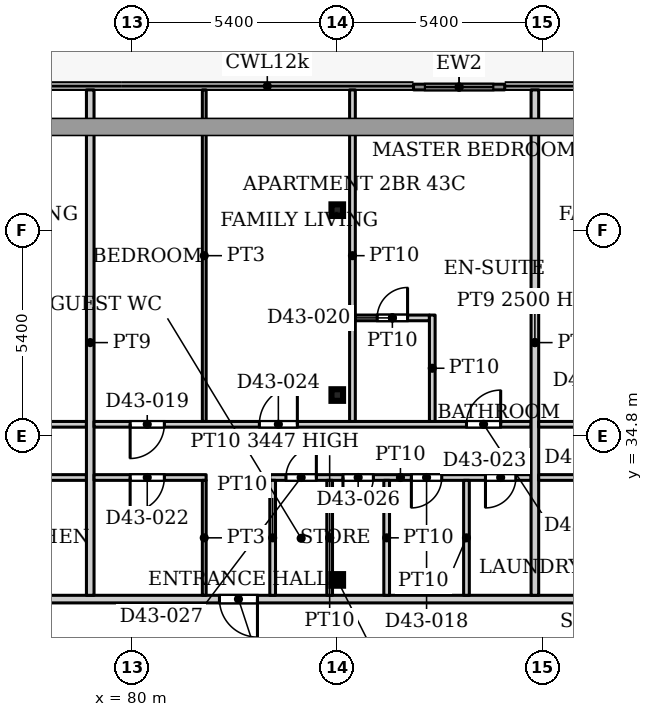
"""IFC4 building model, lengths in metres.
Left out: names, types, materials, properties, quantities, classifications, styles, units other than length and angle.
Written with IfcOpenShell. Run it as: python <this file> out.ifc"""

import sys

from ifc_helpers import new_model, si_unit, direction, frame, frame_2d, origin, origin_2d, place, context, subcontext, project, spatial, rectangle, hollow_rectangle, extrude, source, transform, mapped, element, fill, save


model = new_model("IFC4")
c1 = context("Model", 3, precision=1e-05, world=origin(), true_north=direction((0.0, 1.0)))
c2 = subcontext(c1, "Body", "Model", "MODEL_VIEW")
j1 = project(units=[si_unit("LENGTHUNIT", "METRE"), si_unit("PLANEANGLEUNIT", "RADIAN")], contexts=[c1])
p1 = place(None, origin())
s1 = spatial("IfcSite", under=j1, at=p1, CompositionType="ELEMENT")
p2 = place(p1, origin())
s2 = spatial("IfcBuilding", under=s1, at=p2, CompositionType="ELEMENT")
p3 = place(p2, frame((0.0, 0.0, 183.8)))
s3 = spatial("IfcBuildingStorey", under=s2, at=p3, CompositionType="ELEMENT", Elevation=183.8)
for number, where, z_axis, x_axis in (
    (1, (85.4, 31.005, 0.0), (0.0, 0.0, 1.0), (1.0, 0.0, 0.0)),
    (2, (85.4, 35.87, 0.0), (0.0, 0.0, 1.0), (1.0, 0.0, 0.0)),
    (3, (85.4, 40.735, 0.0), (0.0, 0.0, 1.0), (1.0, 0.0, 0.0)),
):
    element("IfcColumn", number, at=place(p3, frame(where, z_axis=z_axis, x_axis=x_axis)), inside=s3, PredefinedType="COLUMN", context=c2, shape_type="SweptSolid", body=[
        extrude(hollow_rectangle(XDim=0.305, YDim=0.305, WallThickness=0.016, InnerFilletRadius=0.016, OuterFilletRadius=0.032, at=origin_2d()), origin(), (0.0, 0.0, 1.0), 3.9),
    ])
p4 = place(p3, frame((87.406, 43.975, 0.0), z_axis=(0.0, 0.0, 1.0), x_axis=(1.0, 0.0, 0.0)))
e4 = element("IfcWall", 4, at=p4, inside=s3, PredefinedType="SOLIDWALL", context=c2, shape_type="SweptSolid", body=[
    extrude(rectangle(XDim=2.4, YDim=0.15, at=frame_2d((1.2, 0.0))), origin(), (0.0, 0.0, 1.0), 3.75),
])
p5 = place(p4, frame((0.3, 0.0, 0.0)))
e5 = element("IfcOpeningElement", 5, at=p5, cuts=e4, PredefinedType="OPENING", context=c2, shape_type="SweptSolid", body=[
    extrude(rectangle(XDim=1.8, YDim=2.4, at=frame_2d((0.9, 1.2))), frame((0.0, 0.085, 0.0), z_axis=(0.0, -1.0, 0.0), x_axis=(1.0, 0.0, 0.0)), (0.0, 0.0, 1.0), 0.17),
])
p6 = place(p3, frame((53.549, 30.5, 0.0), z_axis=(0.0, 0.0, 1.0), x_axis=(1.0, 0.0, 0.0)))
e6 = element("IfcWall", 6, at=p6, inside=s3, PredefinedType="PARTITIONING", context=c2, shape_type="SweptSolid", body=[
    extrude(rectangle(XDim=44.551, YDim=0.2, at=frame_2d((22.275, 0.0))), origin(), (0.0, 0.0, 1.0), 3.6),
])
p7 = place(p6, frame((8.351, 0.0, 0.0)))
e7 = element("IfcOpeningElement", 7, at=p7, cuts=e6, PredefinedType="OPENING", context=c2, shape_type="SweptSolid", body=[
    extrude(rectangle(XDim=1.0, YDim=2.1, at=frame_2d((0.5, 1.05))), frame((0.0, 0.11, 0.0), z_axis=(0.0, -1.0, 0.0), x_axis=(1.0, 0.0, 0.0)), (0.0, 0.0, 1.0), 0.22),
])
p8 = place(p6, frame((12.551, 0.0, 0.0)))
e8 = element("IfcOpeningElement", 8, at=p8, cuts=e6, PredefinedType="OPENING", context=c2, shape_type="SweptSolid", body=[
    extrude(rectangle(XDim=1.0, YDim=2.1, at=frame_2d((0.5, 1.05))), frame((0.0, 0.11, 0.0), z_axis=(0.0, -1.0, 0.0), x_axis=(1.0, 0.0, 0.0)), (0.0, 0.0, 1.0), 0.22),
])
p9 = place(p6, frame((28.751, 0.0, 0.0)))
e9 = element("IfcOpeningElement", 9, at=p9, cuts=e6, PredefinedType="OPENING", context=c2, shape_type="SweptSolid", body=[
    extrude(rectangle(XDim=1.0, YDim=2.1, at=frame_2d((0.5, 1.05))), frame((0.0, 0.11, 0.0), z_axis=(0.0, -1.0, 0.0), x_axis=(1.0, 0.0, 0.0)), (0.0, 0.0, 1.0), 0.22),
])
p10 = place(p6, frame((40.751, 0.0, 0.0)))
e10 = element("IfcOpeningElement", 10, at=p10, cuts=e6, PredefinedType="OPENING", context=c2, shape_type="SweptSolid", body=[
    extrude(rectangle(XDim=1.0, YDim=2.1, at=frame_2d((0.5, 1.05))), frame((0.0, 0.11, 0.0), z_axis=(0.0, -1.0, 0.0), x_axis=(1.0, 0.0, 0.0)), (0.0, 0.0, 1.0), 0.22),
])
p11 = place(p3, frame((65.5, 35.1, 0.0), z_axis=(0.0, 0.0, 1.0), x_axis=(1.0, 0.0, 0.0)))
e11 = element("IfcWall", 11, at=p11, inside=s3, PredefinedType="PARTITIONING", context=c2, shape_type="SweptSolid", body=[
    extrude(rectangle(XDim=13.3, YDim=0.15, at=frame_2d((6.65, 0.0))), origin(), (0.0, 0.0, 1.0), 3.6),
])
p12 = place(p11, frame((1.4, 0.0, 0.0)))
e12 = element("IfcOpeningElement", 12, at=p12, cuts=e11, PredefinedType="OPENING", context=c2, shape_type="SweptSolid", body=[
    extrude(rectangle(XDim=0.9, YDim=2.1, at=frame_2d((0.45, 1.05))), frame((0.0, 0.085, 0.0), z_axis=(0.0, -1.0, 0.0), x_axis=(1.0, 0.0, 0.0)), (0.0, 0.0, 1.0), 0.17),
])
p13 = place(p11, frame((10.5, 0.0, 0.0)))
e13 = element("IfcOpeningElement", 13, at=p13, cuts=e11, PredefinedType="OPENING", context=c2, shape_type="SweptSolid", body=[
    extrude(rectangle(XDim=1.0, YDim=2.1, at=frame_2d((0.5, 1.05))), frame((0.0, 0.085, 0.0), z_axis=(0.0, -1.0, 0.0), x_axis=(1.0, 0.0, 0.0)), (0.0, 0.0, 1.0), 0.17),
])
p14 = place(p11, frame((6.8, 0.0, 0.0)))
e14 = element("IfcOpeningElement", 14, at=p14, cuts=e11, PredefinedType="OPENING", context=c2, shape_type="SweptSolid", body=[
    extrude(rectangle(XDim=0.9, YDim=2.1, at=frame_2d((0.45, 1.05))), frame((0.0, 0.085, 0.0), z_axis=(0.0, -1.0, 0.0), x_axis=(1.0, 0.0, 0.0)), (0.0, 0.0, 1.0), 0.17),
])
p15 = place(p3, frame((68.625, 33.7, 0.0), z_axis=(0.0, 0.0, 1.0), x_axis=(1.0, 0.0, 0.0)))
e15 = element("IfcWall", 15, at=p15, inside=s3, PredefinedType="PARTITIONING", context=c2, shape_type="SweptSolid", body=[
    extrude(rectangle(XDim=10.175, YDim=0.15, at=frame_2d((5.087, 0.0))), origin(), (0.0, 0.0, 1.0), 3.6),
])
p16 = place(p15, frame((1.175, 0.0, 0.0)))
e16 = element("IfcOpeningElement", 16, at=p16, cuts=e15, PredefinedType="OPENING", context=c2, shape_type="SweptSolid", body=[
    extrude(rectangle(XDim=0.8, YDim=2.1, at=frame_2d((0.4, 1.05))), frame((0.0, 0.085, 0.0), z_axis=(0.0, -1.0, 0.0), x_axis=(1.0, 0.0, 0.0)), (0.0, 0.0, 1.0), 0.17),
])
p17 = place(p15, frame((7.025, 0.0, 0.0)))
e17 = element("IfcOpeningElement", 17, at=p17, cuts=e15, PredefinedType="OPENING", context=c2, shape_type="SweptSolid", body=[
    extrude(rectangle(XDim=0.9, YDim=2.1, at=frame_2d((0.45, 1.05))), frame((0.0, 0.085, 0.0), z_axis=(0.0, -1.0, 0.0), x_axis=(1.0, 0.0, 0.0)), (0.0, 0.0, 1.0), 0.17),
])
p18 = place(p15, frame((3.875, 0.0, 0.0)))
e18 = element("IfcOpeningElement", 18, at=p18, cuts=e15, PredefinedType="OPENING", context=c2, shape_type="SweptSolid", body=[
    extrude(rectangle(XDim=0.8, YDim=2.1, at=frame_2d((0.4, 1.05))), frame((0.0, 0.085, 0.0), z_axis=(0.0, -1.0, 0.0), x_axis=(1.0, 0.0, 0.0)), (0.0, 0.0, 1.0), 0.17),
])
p19 = place(p3, frame((78.9, 30.6, 0.0), z_axis=(0.0, 0.0, 1.0), x_axis=(0.0, 1.0, 0.0)))
e19 = element("IfcWall", 19, at=p19, inside=s3, PredefinedType="PARTITIONING", context=c2, shape_type="SweptSolid", body=[
    extrude(rectangle(XDim=13.3, YDim=0.2, at=frame_2d((6.65, 0.0))), origin(), (0.0, 0.0, 1.0), 3.6),
])
p20 = place(p3, frame((79.0, 33.7, 0.0), z_axis=(0.0, 0.0, 1.0), x_axis=(1.0, 0.0, 0.0)))
e20 = element("IfcWall", 20, at=p20, inside=s3, PredefinedType="PARTITIONING", context=c2, shape_type="SweptSolid", body=[
    extrude(rectangle(XDim=2.95, YDim=0.15, at=frame_2d((1.475, 0.0))), origin(), (0.0, 0.0, 1.0), 3.6),
])
p21 = place(p20, frame((0.95, 0.0, 0.0)))
e21 = element("IfcOpeningElement", 21, at=p21, cuts=e20, PredefinedType="OPENING", context=c2, shape_type="SweptSolid", body=[
    extrude(rectangle(XDim=0.9, YDim=2.1, at=frame_2d((0.45, 1.05))), frame((0.0, 0.085, 0.0), z_axis=(0.0, -1.0, 0.0), x_axis=(1.0, 0.0, 0.0)), (0.0, 0.0, 1.0), 0.17),
])
p22 = place(p3, frame((79.0, 35.1, 0.0), z_axis=(0.0, 0.0, 1.0), x_axis=(1.0, 0.0, 0.0)))
e22 = element("IfcWall", 22, at=p22, inside=s3, PredefinedType="PARTITIONING", context=c2, shape_type="SweptSolid", body=[
    extrude(rectangle(XDim=11.5, YDim=0.15, at=frame_2d((5.75, 0.0))), origin(), (0.0, 0.0, 1.0), 3.6),
])
p23 = place(p22, frame((0.95, 0.0, 0.0)))
e23 = element("IfcOpeningElement", 23, at=p23, cuts=e22, PredefinedType="OPENING", context=c2, shape_type="SweptSolid", body=[
    extrude(rectangle(XDim=0.9, YDim=2.1, at=frame_2d((0.45, 1.05))), frame((0.0, 0.085, 0.0), z_axis=(0.0, -1.0, 0.0), x_axis=(1.0, 0.0, 0.0)), (0.0, 0.0, 1.0), 0.17),
])
p24 = place(p22, frame((4.35, 0.0, 0.0)))
e24 = element("IfcOpeningElement", 24, at=p24, cuts=e22, PredefinedType="OPENING", context=c2, shape_type="SweptSolid", body=[
    extrude(rectangle(XDim=1.0, YDim=2.1, at=frame_2d((0.5, 1.05))), frame((0.0, 0.085, 0.0), z_axis=(0.0, -1.0, 0.0), x_axis=(1.0, 0.0, 0.0)), (0.0, 0.0, 1.0), 0.17),
])
p25 = place(p22, frame((9.8, 0.0, 0.0)))
e25 = element("IfcOpeningElement", 25, at=p25, cuts=e22, PredefinedType="OPENING", context=c2, shape_type="SweptSolid", body=[
    extrude(rectangle(XDim=0.9, YDim=2.1, at=frame_2d((0.45, 1.05))), frame((0.0, 0.085, 0.0), z_axis=(0.0, -1.0, 0.0), x_axis=(1.0, 0.0, 0.0)), (0.0, 0.0, 1.0), 0.17),
])
p26 = place(p3, frame((81.9, 30.6, 0.0), z_axis=(0.0, 0.0, 1.0), x_axis=(0.0, 1.0, 0.0)))
e26 = element("IfcWall", 26, at=p26, inside=s3, PredefinedType="PARTITIONING", context=c2, shape_type="SweptSolid", body=[
    extrude(rectangle(XDim=3.025, YDim=0.1, at=frame_2d((1.512, 0.0))), origin(), (0.0, 0.0, 1.0), 3.6),
])
p27 = place(p3, frame((81.9, 35.175, 0.0), z_axis=(0.0, 0.0, 1.0), x_axis=(0.0, 1.0, 0.0)))
e27 = element("IfcWall", 27, at=p27, inside=s3, PredefinedType="PARTITIONING", context=c2, shape_type="SweptSolid", body=[
    extrude(rectangle(XDim=8.725, YDim=0.1, at=frame_2d((4.362, 0.0))), origin(), (0.0, 0.0, 1.0), 3.6),
])
p28 = place(p3, frame((83.625, 33.7, 0.0), z_axis=(0.0, 0.0, 1.0), x_axis=(1.0, 0.0, 0.0)))
e28 = element("IfcWall", 28, at=p28, inside=s3, PredefinedType="PARTITIONING", context=c2, shape_type="SweptSolid", body=[
    extrude(rectangle(XDim=6.875, YDim=0.15, at=frame_2d((3.438, 0.0))), origin(), (0.0, 0.0, 1.0), 3.6),
])
p29 = place(p28, frame((3.725, 0.0, 0.0)))
e29 = element("IfcOpeningElement", 29, at=p29, cuts=e28, PredefinedType="OPENING", context=c2, shape_type="SweptSolid", body=[
    extrude(rectangle(XDim=0.8, YDim=2.1, at=frame_2d((0.4, 1.05))), frame((0.0, 0.085, 0.0), z_axis=(0.0, -1.0, 0.0), x_axis=(1.0, 0.0, 0.0)), (0.0, 0.0, 1.0), 0.17),
])
p30 = place(p28, frame((5.675, 0.0, 0.0)))
e30 = element("IfcOpeningElement", 30, at=p30, cuts=e28, PredefinedType="OPENING", context=c2, shape_type="SweptSolid", body=[
    extrude(rectangle(XDim=0.8, YDim=2.1, at=frame_2d((0.4, 1.05))), frame((0.0, 0.085, 0.0), z_axis=(0.0, -1.0, 0.0), x_axis=(1.0, 0.0, 0.0)), (0.0, 0.0, 1.0), 0.17),
])
p31 = place(p28, frame((1.925, 0.0, 0.0)))
e31 = element("IfcOpeningElement", 31, at=p31, cuts=e28, PredefinedType="OPENING", context=c2, shape_type="SweptSolid", body=[
    extrude(rectangle(XDim=0.8, YDim=2.1, at=frame_2d((0.4, 1.05))), frame((0.0, 0.085, 0.0), z_axis=(0.0, -1.0, 0.0), x_axis=(1.0, 0.0, 0.0)), (0.0, 0.0, 1.0), 0.17),
])
p32 = place(p28, frame((0.425, 0.0, 0.0)))
e32 = element("IfcOpeningElement", 32, at=p32, cuts=e28, PredefinedType="OPENING", context=c2, shape_type="SweptSolid", body=[
    extrude(rectangle(XDim=0.8, YDim=2.1, at=frame_2d((0.4, 1.05))), frame((0.0, 0.085, 0.0), z_axis=(0.0, -1.0, 0.0), x_axis=(1.0, 0.0, 0.0)), (0.0, 0.0, 1.0), 0.17),
])
p33 = place(p3, frame((83.7, 30.6, 0.0), z_axis=(0.0, 0.0, 1.0), x_axis=(0.0, 1.0, 0.0)))
e33 = element("IfcWall", 33, at=p33, inside=s3, PredefinedType="PARTITIONING", context=c2, shape_type="SweptSolid", body=[
    extrude(rectangle(XDim=3.025, YDim=0.15, at=frame_2d((1.512, 0.0))), origin(), (0.0, 0.0, 1.0), 3.6),
])
p34 = place(p3, frame((85.2, 30.6, 0.0), z_axis=(0.0, 0.0, 1.0), x_axis=(0.0, 1.0, 0.0)))
e34 = element("IfcWall", 34, at=p34, inside=s3, PredefinedType="PARTITIONING", context=c2, shape_type="SweptSolid", body=[
    extrude(rectangle(XDim=3.025, YDim=0.15, at=frame_2d((1.512, 0.0))), origin(), (0.0, 0.0, 1.0), 3.447),
])
p35 = place(p3, frame((85.8, 35.175, 0.0), z_axis=(0.0, 0.0, 1.0), x_axis=(0.0, 1.0, 0.0)))
e35 = element("IfcWall", 35, at=p35, inside=s3, PredefinedType="PARTITIONING", context=c2, shape_type="SweptSolid", body=[
    extrude(rectangle(XDim=8.725, YDim=0.15, at=frame_2d((4.362, 0.0))), origin(), (0.0, 0.0, 1.0), 3.6),
])
p36 = place(p3, frame((85.875, 37.9, 0.0), z_axis=(0.0, 0.0, 1.0), x_axis=(1.0, 0.0, 0.0)))
e36 = element("IfcWall", 36, at=p36, inside=s3, PredefinedType="PARTITIONING", context=c2, shape_type="SweptSolid", body=[
    extrude(rectangle(XDim=1.95, YDim=0.15, at=frame_2d((0.975, 0.0))), origin(), (0.0, 0.0, 1.0), 3.6),
])
p37 = place(p36, frame((0.575, 0.0, 0.0)))
e37 = element("IfcOpeningElement", 37, at=p37, cuts=e36, PredefinedType="OPENING", context=c2, shape_type="SweptSolid", body=[
    extrude(rectangle(XDim=0.8, YDim=2.1, at=frame_2d((0.4, 1.05))), frame((0.0, 0.085, 0.0), z_axis=(0.0, -1.0, 0.0), x_axis=(1.0, 0.0, 0.0)), (0.0, 0.0, 1.0), 0.17),
])
p38 = place(p3, frame((86.7, 30.6, 0.0), z_axis=(0.0, 0.0, 1.0), x_axis=(0.0, 1.0, 0.0)))
e38 = element("IfcWall", 38, at=p38, inside=s3, PredefinedType="PARTITIONING", context=c2, shape_type="SweptSolid", body=[
    extrude(rectangle(XDim=3.025, YDim=0.15, at=frame_2d((1.512, 0.0))), origin(), (0.0, 0.0, 1.0), 3.6),
])
p39 = place(p3, frame((87.9, 35.175, 0.0), z_axis=(0.0, 0.0, 1.0), x_axis=(0.0, 1.0, 0.0)))
e39 = element("IfcWall", 39, at=p39, inside=s3, PredefinedType="PARTITIONING", context=c2, shape_type="SweptSolid", body=[
    extrude(rectangle(XDim=2.8, YDim=0.15, at=frame_2d((1.4, 0.0))), origin(), (0.0, 0.0, 1.0), 3.6),
])
p40 = place(p3, frame((88.8, 30.6, 0.0), z_axis=(0.0, 0.0, 1.0), x_axis=(0.0, 1.0, 0.0)))
e40 = element("IfcWall", 40, at=p40, inside=s3, PredefinedType="PARTITIONING", context=c2, shape_type="SweptSolid", body=[
    extrude(rectangle(XDim=3.025, YDim=0.15, at=frame_2d((1.512, 0.0))), origin(), (0.0, 0.0, 1.0), 3.6),
])
p41 = place(p3, frame((90.6, 30.6, 0.0), z_axis=(0.0, 0.0, 1.0), x_axis=(0.0, 1.0, 0.0)))
e41 = element("IfcWall", 41, at=p41, inside=s3, PredefinedType="PARTITIONING", context=c2, shape_type="SweptSolid", body=[
    extrude(rectangle(XDim=13.3, YDim=0.2, at=frame_2d((6.65, 0.0))), origin(), (0.0, 0.0, 1.0), 2.5),
])
p42 = place(p3, frame((90.7, 33.7, 0.0), z_axis=(0.0, 0.0, 1.0), x_axis=(1.0, 0.0, 0.0)))
e42 = element("IfcWall", 42, at=p42, inside=s3, PredefinedType="PARTITIONING", context=c2, shape_type="SweptSolid", body=[
    extrude(rectangle(XDim=3.25, YDim=0.15, at=frame_2d((1.625, 0.0))), origin(), (0.0, 0.0, 1.0), 3.6),
])
p43 = place(p42, frame((1.1, 0.0, 0.0)))
e43 = element("IfcOpeningElement", 43, at=p43, cuts=e42, PredefinedType="OPENING", context=c2, shape_type="SweptSolid", body=[
    extrude(rectangle(XDim=0.9, YDim=2.1, at=frame_2d((0.45, 1.05))), frame((0.0, 0.085, 0.0), z_axis=(0.0, -1.0, 0.0), x_axis=(1.0, 0.0, 0.0)), (0.0, 0.0, 1.0), 0.17),
])
p44 = place(p3, frame((90.7, 35.1, 0.0), z_axis=(0.0, 0.0, 1.0), x_axis=(1.0, 0.0, 0.0)))
e44 = element("IfcWall", 44, at=p44, inside=s3, PredefinedType="PARTITIONING", context=c2, shape_type="SweptSolid", body=[
    extrude(rectangle(XDim=9.2, YDim=0.15, at=frame_2d((4.6, 0.0))), origin(), (0.0, 0.0, 1.0), 3.6),
])
p45 = place(p44, frame((6.8, 0.0, 0.0)))
e45 = element("IfcOpeningElement", 45, at=p45, cuts=e44, PredefinedType="OPENING", context=c2, shape_type="SweptSolid", body=[
    extrude(rectangle(XDim=0.9, YDim=2.1, at=frame_2d((0.45, 1.05))), frame((0.0, 0.085, 0.0), z_axis=(0.0, -1.0, 0.0), x_axis=(1.0, 0.0, 0.0)), (0.0, 0.0, 1.0), 0.17),
])
p46 = place(p44, frame((2.1, 0.0, 0.0)))
e46 = element("IfcOpeningElement", 46, at=p46, cuts=e44, PredefinedType="OPENING", context=c2, shape_type="SweptSolid", body=[
    extrude(rectangle(XDim=1.0, YDim=2.1, at=frame_2d((0.5, 1.05))), frame((0.0, 0.085, 0.0), z_axis=(0.0, -1.0, 0.0), x_axis=(1.0, 0.0, 0.0)), (0.0, 0.0, 1.0), 0.17),
])
m1 = source(origin(), c2, "Body", "SweptSolid", [
    extrude(rectangle(XDim=1.8, YDim=2.4, at=frame_2d((0.9, 1.2))), frame((0.0, 0.025, 0.0), z_axis=(0.0, -1.0, 0.0), x_axis=(1.0, 0.0, 0.0)), (0.0, 0.0, 1.0), 0.05),
])
p47 = place(p5, origin())
e47 = element("IfcDoor", 47, at=p47, inside=s3, OperationType="SLIDING_TO_LEFT", PredefinedType="DOOR", context=c2, shape_type="MappedRepresentation", body=[
    mapped(m1, transform((0.0, 0.0, 0.0), x_axis=(1.0, 0.0, 0.0), y_axis=(0.0, 1.0, 0.0), z_axis=(0.0, 0.0, 1.0), scale=1.0)),
])
fill(e5, e47)
m2 = source(origin(), c2, "Body", "SweptSolid", [
    extrude(rectangle(XDim=0.8, YDim=2.1, at=frame_2d((0.4, 1.05))), frame((0.0, 0.025, 0.0), z_axis=(0.0, -1.0, 0.0), x_axis=(1.0, 0.0, 0.0)), (0.0, 0.0, 1.0), 0.05),
])
p48 = place(p29, origin())
e48 = element("IfcDoor", 48, at=p48, inside=s3, OperationType="SINGLE_SWING_RIGHT", PredefinedType="DOOR", context=c2, shape_type="MappedRepresentation", body=[
    mapped(m2, transform((0.0, 0.0, 0.0), x_axis=(1.0, 0.0, 0.0), y_axis=(0.0, 1.0, 0.0), z_axis=(0.0, 0.0, 1.0), scale=1.0)),
])
fill(e29, e48)
m3 = source(origin(), c2, "Body", "SweptSolid", [
    extrude(rectangle(XDim=0.9, YDim=2.1, at=frame_2d((0.45, 1.05))), frame((0.0, 0.025, 0.0), z_axis=(0.0, -1.0, 0.0), x_axis=(1.0, 0.0, 0.0)), (0.0, 0.0, 1.0), 0.05),
])
p49 = place(p23, origin())
e49 = element("IfcDoor", 49, at=p49, inside=s3, OperationType="SINGLE_SWING_RIGHT", PredefinedType="DOOR", context=c2, shape_type="MappedRepresentation", body=[
    mapped(m3, transform((0.0, 0.0, 0.0), x_axis=(1.0, 0.0, 0.0), y_axis=(0.0, 1.0, 0.0), z_axis=(0.0, 0.0, 1.0), scale=1.0)),
])
fill(e23, e49)
p50 = place(p37, origin())
e50 = element("IfcDoor", 50, at=p50, inside=s3, OperationType="SINGLE_SWING_LEFT", PredefinedType="DOOR", context=c2, shape_type="MappedRepresentation", body=[
    mapped(m2, transform((0.0, 0.0, 0.0), x_axis=(1.0, 0.0, 0.0), y_axis=(0.0, 1.0, 0.0), z_axis=(0.0, 0.0, 1.0), scale=1.0)),
])
fill(e37, e50)
m4 = source(origin(), c2, "Body", "SweptSolid", [
    extrude(rectangle(XDim=1.0, YDim=2.1, at=frame_2d((0.5, 1.05))), frame((0.0, 0.025, 0.0), z_axis=(0.0, -1.0, 0.0), x_axis=(1.0, 0.0, 0.0)), (0.0, 0.0, 1.0), 0.05),
])
p51 = place(p9, origin())
e51 = element("IfcDoor", 51, at=p51, inside=s3, OperationType="SINGLE_SWING_RIGHT", PredefinedType="DOOR", context=c2, shape_type="MappedRepresentation", body=[
    mapped(m4, transform((0.0, 0.0, 0.0), x_axis=(1.0, 0.0, 0.0), y_axis=(0.0, 1.0, 0.0), z_axis=(0.0, 0.0, 1.0), scale=1.0)),
])
fill(e9, e51)
p52 = place(p21, origin())
e52 = element("IfcDoor", 52, at=p52, inside=s3, OperationType="SINGLE_SWING_RIGHT", PredefinedType="DOOR", context=c2, shape_type="MappedRepresentation", body=[
    mapped(m3, transform((0.0, 0.0, 0.0), x_axis=(1.0, 0.0, 0.0), y_axis=(0.0, 1.0, 0.0), z_axis=(0.0, 0.0, 1.0), scale=1.0)),
])
fill(e21, e52)
p53 = place(p30, origin())
e53 = element("IfcDoor", 53, at=p53, inside=s3, OperationType="SINGLE_SWING_RIGHT", PredefinedType="DOOR", context=c2, shape_type="MappedRepresentation", body=[
    mapped(m2, transform((0.0, 0.0, 0.0), x_axis=(1.0, 0.0, 0.0), y_axis=(0.0, 1.0, 0.0), z_axis=(0.0, 0.0, 1.0), scale=1.0)),
])
fill(e30, e53)
m5 = source(origin(), c2, "Body", "SweptSolid", [
    extrude(rectangle(XDim=1.0, YDim=2.1, at=frame_2d((0.5, 1.05))), frame((0.0, 0.025, 0.0), z_axis=(0.0, -1.0, 0.0), x_axis=(1.0, 0.0, 0.0)), (0.0, 0.0, 1.0), 0.05),
])
p54 = place(p24, origin())
e54 = element("IfcDoor", 54, at=p54, inside=s3, OperationType="SINGLE_SWING_LEFT", PredefinedType="DOOR", context=c2, shape_type="MappedRepresentation", body=[
    mapped(m5, transform((0.0, 0.0, 0.0), x_axis=(1.0, 0.0, 0.0), y_axis=(0.0, 1.0, 0.0), z_axis=(0.0, 0.0, 1.0), scale=1.0)),
])
fill(e24, e54)
p55 = place(p25, origin())
e55 = element("IfcDoor", 55, at=p55, inside=s3, OperationType="SINGLE_SWING_LEFT", PredefinedType="DOOR", context=c2, shape_type="MappedRepresentation", body=[
    mapped(m3, transform((0.0, 0.0, 0.0), x_axis=(1.0, 0.0, 0.0), y_axis=(0.0, 1.0, 0.0), z_axis=(0.0, 0.0, 1.0), scale=1.0)),
])
fill(e25, e55)
p56 = place(p31, origin())
e56 = element("IfcDoor", 56, at=p56, inside=s3, OperationType="SINGLE_SWING_RIGHT", PredefinedType="DOOR", context=c2, shape_type="MappedRepresentation", body=[
    mapped(m2, transform((0.0, 0.0, 0.0), x_axis=(1.0, 0.0, 0.0), y_axis=(0.0, 1.0, 0.0), z_axis=(0.0, 0.0, 1.0), scale=1.0)),
])
fill(e31, e56)
p57 = place(p32, origin())
e57 = element("IfcDoor", 57, at=p57, inside=s3, OperationType="SINGLE_SWING_LEFT", PredefinedType="DOOR", context=c2, shape_type="MappedRepresentation", body=[
    mapped(m2, transform((0.0, 0.0, 0.0), x_axis=(1.0, 0.0, 0.0), y_axis=(0.0, 1.0, 0.0), z_axis=(0.0, 0.0, 1.0), scale=1.0)),
])
fill(e32, e57)
save(model, sys.argv[1])
